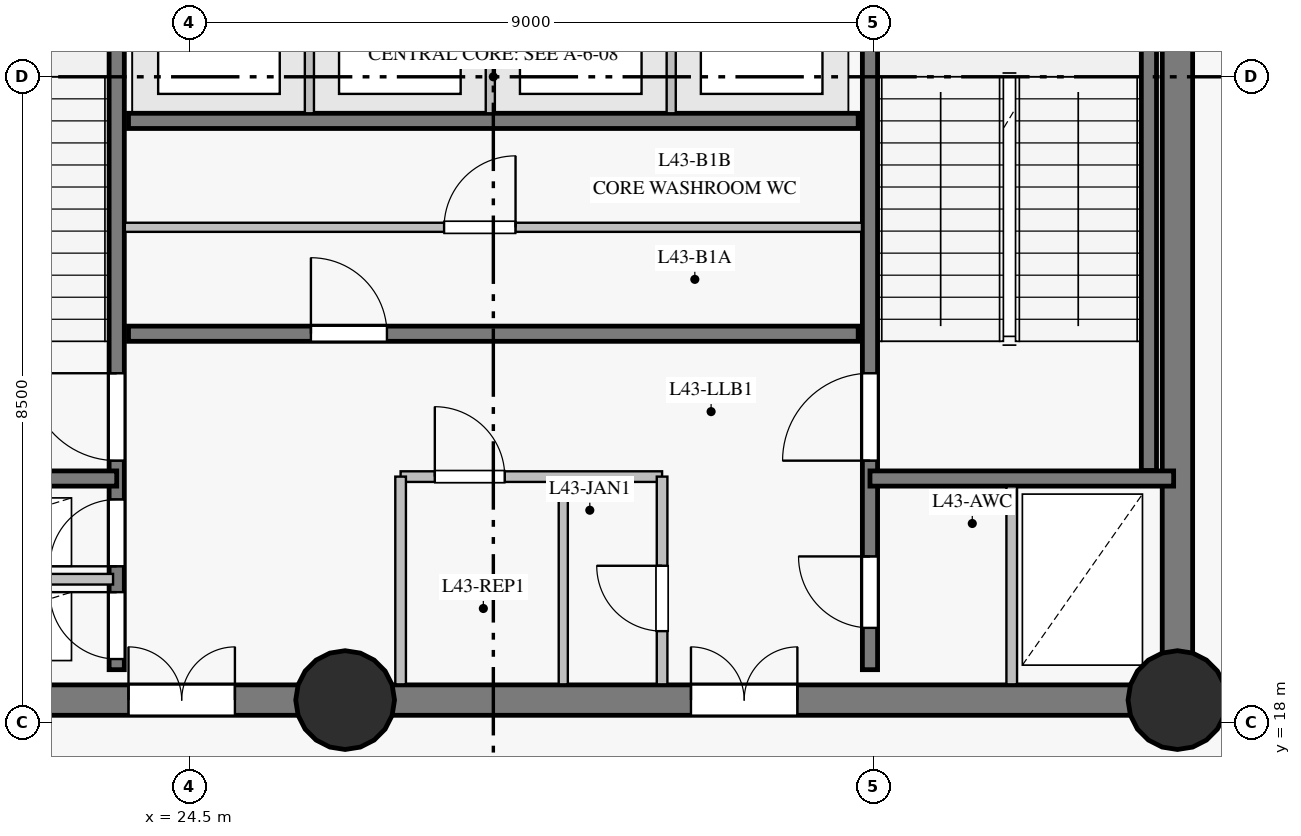
"""IFC4 building model, lengths in metres.
Left out: names, types, materials, properties, quantities, classifications, styles, units other than length and angle.
Written with IfcOpenShell. Run it as: python <this file> out.ifc"""

import sys

from ifc_helpers import new_model, si_unit, direction, frame, frame_2d, origin, origin_with_axes, origin_2d, place, context, subcontext, project, spatial, rectangle, circle, extrude, source, transform, mapped, element, fill, save


model = new_model("IFC4")
c1 = context("Model", 3, precision=1e-05, world=origin(), true_north=direction((0.0, 1.0)))
c2 = subcontext(c1, "Body", "Model", "MODEL_VIEW")
j1 = project(units=[si_unit("LENGTHUNIT", "METRE"), si_unit("PLANEANGLEUNIT", "RADIAN")], contexts=[c1])
p1 = place(None, origin())
s1 = spatial("IfcSite", under=j1, at=p1, CompositionType="ELEMENT")
p2 = place(p1, origin())
s2 = spatial("IfcBuilding", under=s1, at=p2, CompositionType="ELEMENT")
p3 = place(p2, frame((0.0, 0.0, 152.55)))
s3 = spatial("IfcBuildingStorey", under=s2, at=p3, CompositionType="ELEMENT", Elevation=152.55)
p4 = place(p3, frame((19.5, 18.3, 0.0), z_axis=(0.0, 0.0, 1.0), x_axis=(1.0, 0.0, 0.0)))
e1 = element("IfcWall", 1, at=p4, inside=s3, PredefinedType="SHEAR", context=c2, shape_type="SweptSolid", body=[
    extrude(rectangle(XDim=7.05, YDim=0.4, at=frame_2d((3.525, 0.0))), origin(), (0.0, 0.0, 1.0), 3.775),
])
p5 = place(p4, frame((4.2, 0.0, 0.0)))
e2 = element("IfcOpeningElement", 2, at=p5, cuts=e1, PredefinedType="OPENING", context=c2, shape_type="SweptSolid", body=[
    extrude(rectangle(XDim=1.4, YDim=2.2, at=frame_2d((0.7, 1.1))), frame((0.0, 0.21, 0.0), z_axis=(0.0, -1.0, 0.0), x_axis=(1.0, 0.0, 0.0)), (0.0, 0.0, 1.0), 0.42),
])
p6 = place(p3, frame((26.55, 18.3, 0.0), z_axis=(0.0, 0.0, 1.0), x_axis=(1.0, 0.0, 0.0)))
e3 = element("IfcWall", 3, at=p6, inside=s3, PredefinedType="SHEAR", context=c2, shape_type="SweptSolid", body=[
    extrude(rectangle(XDim=10.95, YDim=0.4, at=frame_2d((5.475, 0.0))), origin(), (0.0, 0.0, 1.0), 3.775),
])
p7 = place(p6, frame((4.55, 0.0, 0.0)))
e4 = element("IfcOpeningElement", 4, at=p7, cuts=e3, PredefinedType="OPENING", context=c2, shape_type="SweptSolid", body=[
    extrude(rectangle(XDim=1.4, YDim=2.2, at=frame_2d((0.7, 1.1))), frame((0.0, 0.21, 0.0), z_axis=(0.0, -1.0, 0.0), x_axis=(1.0, 0.0, 0.0)), (0.0, 0.0, 1.0), 0.42),
])
p8 = place(p3, frame((37.5, 18.3, 0.0), z_axis=(0.0, 0.0, 1.0), x_axis=(0.0, 1.0, 0.0)))
e5 = element("IfcWall", 5, at=p8, inside=s3, PredefinedType="SHEAR", context=c2, shape_type="SweptSolid", body=[
    extrude(rectangle(XDim=16.4, YDim=0.4, at=frame_2d((8.2, 0.0))), origin(), (0.0, 0.0, 1.0), 3.775),
])
p9 = place(p8, frame((14.15, 0.0, 0.0)))
e6 = element("IfcOpeningElement", 6, at=p9, cuts=e5, PredefinedType="OPENING", context=c2, shape_type="SweptSolid", body=[
    extrude(rectangle(XDim=1.2, YDim=2.15, at=frame_2d((0.6, 1.075))), frame((0.0, 0.21, 0.0), z_axis=(0.0, -1.0, 0.0), x_axis=(1.0, 0.0, 0.0)), (0.0, 0.0, 1.0), 0.42),
])
m1 = source(origin_with_axes(), c2, "Body", "SweptSolid", [
    extrude(circle(Radius=0.65, at=origin_2d()), origin(), (0.0, 0.0, 1.0), 4.0),
])
for number, where, z_axis, x_axis in (
    (7, (26.55, 18.3, 0.0), (0.0, 0.0, 1.0), (1.0, 0.0, 0.0)),
    (8, (37.5, 18.3, 0.0), (0.0, 0.0, 1.0), (1.0, 0.0, 0.0)),
):
    element("IfcColumn", number, at=place(p3, frame(where, z_axis=z_axis, x_axis=x_axis)), inside=s3, PredefinedType="COLUMN", context=c2, shape_type="MappedRepresentation", body=[
        mapped(m1, transform((0.0, 0.0, 0.0), scale=1.0)),
    ])
p10 = place(p3, frame((37.42, 5.238, 0.0), z_axis=(0.0, 0.0, 1.0), x_axis=(0.440185493808, 0.897906861005, 0.0)))
e9 = element("IfcWall", 9, at=p10, inside=s3, PredefinedType="SOLIDWALL", context=c2, shape_type="SweptSolid", body=[
    extrude(rectangle(XDim=13.922, YDim=0.28, at=frame_2d((6.961, 0.0))), origin(), (0.0, 0.0, 1.0), 3.775),
])
p11 = place(p10, frame((2.183, 0.0, 0.85)))
e10 = element("IfcOpeningElement", 10, at=p11, cuts=e9, PredefinedType="OPENING", context=c2, shape_type="SweptSolid", body=[
    extrude(rectangle(XDim=1.75, YDim=1.65, at=frame_2d((0.875, 0.825))), frame((0.0, 0.15, 0.0), z_axis=(0.0, -1.0, 0.0), x_axis=(1.0, 0.0, 0.0)), (0.0, 0.0, 1.0), 0.3),
])
p12 = place(p10, frame((7.23, 0.0, 0.85)))
e11 = element("IfcOpeningElement", 11, at=p12, cuts=e9, PredefinedType="OPENING", context=c2, shape_type="SweptSolid", body=[
    extrude(rectangle(XDim=1.75, YDim=1.65, at=frame_2d((0.875, 0.825))), frame((0.0, 0.15, 0.0), z_axis=(0.0, -1.0, 0.0), x_axis=(1.0, 0.0, 0.0)), (0.0, 0.0, 1.0), 0.3),
])
p13 = place(p10, frame((12.174, 0.0, 0.85)))
e12 = element("IfcOpeningElement", 12, at=p13, cuts=e9, PredefinedType="OPENING", context=c2, shape_type="SweptSolid", body=[
    extrude(rectangle(XDim=0.95, YDim=1.5, at=frame_2d((0.475, 0.75))), frame((0.0, 0.15, 0.0), z_axis=(0.0, -1.0, 0.0), x_axis=(1.0, 0.0, 0.0)), (0.0, 0.0, 1.0), 0.3),
])
p14 = place(p3, frame((23.545, 18.7, 0.0), z_axis=(0.0, 0.0, 1.0), x_axis=(0.0, 1.0, 0.0)))
e13 = element("IfcWall", 13, at=p14, inside=s3, PredefinedType="SHEAR", context=c2, shape_type="SweptSolid", body=[
    extrude(rectangle(XDim=15.6, YDim=0.2, at=frame_2d((7.8, 0.0))), origin(), (0.0, 0.0, 1.0), 3.775),
])
p15 = place(p14, frame((2.75, 0.0, 0.0)))
e14 = element("IfcOpeningElement", 14, at=p15, cuts=e13, PredefinedType="OPENING", context=c2, shape_type="SweptSolid", body=[
    extrude(rectangle(XDim=1.15, YDim=2.15, at=frame_2d((0.575, 1.075))), frame((0.0, 0.11, 0.0), z_axis=(0.0, -1.0, 0.0), x_axis=(1.0, 0.0, 0.0)), (0.0, 0.0, 1.0), 0.22),
])
p16 = place(p14, frame((0.14, 0.0, 0.0)))
e15 = element("IfcOpeningElement", 15, at=p16, cuts=e13, PredefinedType="OPENING", context=c2, shape_type="SweptSolid", body=[
    extrude(rectangle(XDim=0.88, YDim=2.1, at=frame_2d((0.44, 1.05))), frame((0.0, 0.11, 0.0), z_axis=(0.0, -1.0, 0.0), x_axis=(1.0, 0.0, 0.0)), (0.0, 0.0, 1.0), 0.22),
])
p17 = place(p14, frame((1.36, 0.0, 0.0)))
e16 = element("IfcOpeningElement", 16, at=p17, cuts=e13, PredefinedType="OPENING", context=c2, shape_type="SweptSolid", body=[
    extrude(rectangle(XDim=0.88, YDim=2.1, at=frame_2d((0.44, 1.05))), frame((0.0, 0.11, 0.0), z_axis=(0.0, -1.0, 0.0), x_axis=(1.0, 0.0, 0.0)), (0.0, 0.0, 1.0), 0.22),
])
p18 = place(p14, frame((12.1, 0.0, 0.0)))
e17 = element("IfcOpeningElement", 17, at=p18, cuts=e13, PredefinedType="OPENING", context=c2, shape_type="SweptSolid", body=[
    extrude(rectangle(XDim=1.12, YDim=2.15, at=frame_2d((0.56, 1.075))), frame((0.0, 0.11, 0.0), z_axis=(0.0, -1.0, 0.0), x_axis=(1.0, 0.0, 0.0)), (0.0, 0.0, 1.0), 0.22),
])
p19 = place(p14, frame((14.05, 0.0, 0.0)))
e18 = element("IfcOpeningElement", 18, at=p19, cuts=e13, PredefinedType="OPENING", context=c2, shape_type="SweptSolid", body=[
    extrude(rectangle(XDim=1.12, YDim=2.15, at=frame_2d((0.56, 1.075))), frame((0.0, 0.11, 0.0), z_axis=(0.0, -1.0, 0.0), x_axis=(1.0, 0.0, 0.0)), (0.0, 0.0, 1.0), 0.22),
])
p20 = place(p3, frame((33.455, 18.7, 0.0), z_axis=(0.0, 0.0, 1.0), x_axis=(0.0, 1.0, 0.0)))
e19 = element("IfcWall", 19, at=p20, inside=s3, PredefinedType="SHEAR", context=c2, shape_type="SweptSolid", body=[
    extrude(rectangle(XDim=15.6, YDim=0.2, at=frame_2d((7.8, 0.0))), origin(), (0.0, 0.0, 1.0), 3.775),
])
p21 = place(p20, frame((2.75, 0.0, 0.0)))
e20 = element("IfcOpeningElement", 20, at=p21, cuts=e19, PredefinedType="OPENING", context=c2, shape_type="SweptSolid", body=[
    extrude(rectangle(XDim=1.15, YDim=2.15, at=frame_2d((0.575, 1.075))), frame((0.0, 0.11, 0.0), z_axis=(0.0, -1.0, 0.0), x_axis=(1.0, 0.0, 0.0)), (0.0, 0.0, 1.0), 0.22),
])
p22 = place(p20, frame((0.55, 0.0, 0.0)))
e21 = element("IfcOpeningElement", 21, at=p22, cuts=e19, PredefinedType="OPENING", context=c2, shape_type="SweptSolid", body=[
    extrude(rectangle(XDim=0.94, YDim=2.1, at=frame_2d((0.47, 1.05))), frame((0.0, 0.11, 0.0), z_axis=(0.0, -1.0, 0.0), x_axis=(1.0, 0.0, 0.0)), (0.0, 0.0, 1.0), 0.22),
])
p23 = place(p3, frame((23.7, 23.12, 0.0), z_axis=(0.0, 0.0, 1.0), x_axis=(1.0, 0.0, 0.0)))
e22 = element("IfcWall", 22, at=p23, inside=s3, PredefinedType="SHEAR", context=c2, shape_type="SweptSolid", body=[
    extrude(rectangle(XDim=9.6, YDim=0.2, at=frame_2d((4.8, 0.0))), origin(), (0.0, 0.0, 1.0), 3.775),
])
p24 = place(p23, frame((2.4, 0.0, 0.0)))
e23 = element("IfcOpeningElement", 23, at=p24, cuts=e22, PredefinedType="OPENING", context=c2, shape_type="SweptSolid", body=[
    extrude(rectangle(XDim=1.0, YDim=2.15, at=frame_2d((0.5, 1.075))), frame((0.0, 0.11, 0.0), z_axis=(0.0, -1.0, 0.0), x_axis=(1.0, 0.0, 0.0)), (0.0, 0.0, 1.0), 0.22),
])
p25 = place(p3, frame((23.7, 25.92, 0.0), z_axis=(0.0, 0.0, 1.0), x_axis=(1.0, 0.0, 0.0)))
e24 = element("IfcWall", 24, at=p25, inside=s3, PredefinedType="SHEAR", context=c2, shape_type="SweptSolid", body=[
    extrude(rectangle(XDim=9.6, YDim=0.2, at=frame_2d((4.8, 0.0))), origin(), (0.0, 0.0, 1.0), 3.775),
])
p26 = place(p3, frame((37.125, 21.32, 0.0), z_axis=(0.0, 0.0, 1.0), x_axis=(0.0, 1.0, 0.0)))
e25 = element("IfcWall", 25, at=p26, inside=s3, PredefinedType="SHEAR", context=c2, shape_type="SweptSolid", body=[
    extrude(rectangle(XDim=7.5, YDim=0.2, at=frame_2d((3.75, 0.0))), origin(), (0.0, 0.0, 1.0), 3.775),
])
for number, where, z_axis, x_axis in (
    (26, (33.455, 21.215, 0.0), (0.0, 0.0, 1.0), (1.0, 0.0, 0.0)),
    (27, (19.55, 21.215, 0.0), (0.0, 0.0, 1.0), (1.0, 0.0, 0.0)),
):
    element("IfcWall", number, at=place(p3, frame(where, z_axis=z_axis, x_axis=x_axis)), inside=s3, PredefinedType="SHEAR", context=c2, shape_type="SweptSolid", body=[
        extrude(rectangle(XDim=3.995, YDim=0.2, at=frame_2d((1.998, 0.0))), origin(), (0.0, 0.0, 1.0), 3.775),
    ])
p27 = place(p3, frame((23.652, 24.52, 0.0), z_axis=(0.0, 0.0, 1.0), x_axis=(1.0, 0.0, 0.0)))
e28 = element("IfcWall", 28, at=p27, inside=s3, PredefinedType="PARTITIONING", context=c2, shape_type="SweptSolid", body=[
    extrude(rectangle(XDim=9.698, YDim=0.12, at=frame_2d((4.849, 0.0))), origin(), (0.0, 0.0, 1.0), 3.775),
])
p28 = place(p27, frame((4.2, 0.0, 0.0)))
e29 = element("IfcOpeningElement", 29, at=p28, cuts=e28, PredefinedType="OPENING", context=c2, shape_type="SweptSolid", body=[
    extrude(rectangle(XDim=0.94, YDim=2.1, at=frame_2d((0.47, 1.05))), frame((0.0, 0.07, 0.0), z_axis=(0.0, -1.0, 0.0), x_axis=(1.0, 0.0, 0.0)), (0.0, 0.0, 1.0), 0.14),
])
p29 = place(p3, frame((19.707, 19.89, 0.0), z_axis=(0.0, 0.0, 1.0), x_axis=(1.0, 0.0, 0.0)))
e30 = element("IfcWall", 30, at=p29, inside=s3, PredefinedType="PARTITIONING", context=c2, shape_type="SweptSolid", body=[
    extrude(rectangle(XDim=3.79, YDim=0.14, at=frame_2d((1.895, 0.0))), origin(), (0.0, 0.0, 1.0), 3.775),
])
p30 = place(p3, frame((27.28, 21.24, 0.0), z_axis=(0.0, 0.0, 1.0), x_axis=(1.0, 0.0, 0.0)))
e31 = element("IfcWall", 31, at=p30, inside=s3, PredefinedType="PARTITIONING", context=c2, shape_type="SweptSolid", body=[
    extrude(rectangle(XDim=3.44, YDim=0.14, at=frame_2d((1.72, 0.0))), origin(), (0.0, 0.0, 1.0), 3.775),
])
p31 = place(p30, frame((0.45, 0.0, 0.0)))
e32 = element("IfcOpeningElement", 32, at=p31, cuts=e31, PredefinedType="OPENING", context=c2, shape_type="SweptSolid", body=[
    extrude(rectangle(XDim=0.92, YDim=2.1, at=frame_2d((0.46, 1.05))), frame((0.0, 0.08, 0.0), z_axis=(0.0, -1.0, 0.0), x_axis=(1.0, 0.0, 0.0)), (0.0, 0.0, 1.0), 0.16),
])
p32 = place(p3, frame((27.28, 18.507, 0.0), z_axis=(0.0, 0.0, 1.0), x_axis=(0.0, 1.0, 0.0)))
e33 = element("IfcWall", 33, at=p32, inside=s3, PredefinedType="PARTITIONING", context=c2, shape_type="SweptSolid", body=[
    extrude(rectangle(XDim=2.733, YDim=0.14, at=frame_2d((1.366, 0.0))), origin(), (0.0, 0.0, 1.0), 3.775),
])
p33 = place(p3, frame((30.72, 18.507, 0.0), z_axis=(0.0, 0.0, 1.0), x_axis=(0.0, 1.0, 0.0)))
e34 = element("IfcWall", 34, at=p33, inside=s3, PredefinedType="PARTITIONING", context=c2, shape_type="SweptSolid", body=[
    extrude(rectangle(XDim=2.733, YDim=0.14, at=frame_2d((1.366, 0.0))), origin(), (0.0, 0.0, 1.0), 3.775),
])
p34 = place(p33, frame((0.7, 0.0, 0.0)))
e35 = element("IfcOpeningElement", 35, at=p34, cuts=e34, PredefinedType="OPENING", context=c2, shape_type="SweptSolid", body=[
    extrude(rectangle(XDim=0.86, YDim=2.1, at=frame_2d((0.43, 1.05))), frame((0.0, 0.08, 0.0), z_axis=(0.0, -1.0, 0.0), x_axis=(1.0, 0.0, 0.0)), (0.0, 0.0, 1.0), 0.16),
])
for number, where, z_axis, x_axis in (
    (36, (26.08, 26.02, 0.0), (0.0, 0.0, 1.0), (0.0, 1.0, 0.0)),
    (37, (28.46, 26.02, 0.0), (0.0, 0.0, 1.0), (0.0, 1.0, 0.0)),
    (38, (30.84, 26.02, 0.0), (0.0, 0.0, 1.0), (0.0, 1.0, 0.0)),
):
    element("IfcWall", number, at=place(p3, frame(where, z_axis=z_axis, x_axis=x_axis)), inside=s3, PredefinedType="PARTITIONING", context=c2, shape_type="SweptSolid", body=[
        extrude(rectangle(XDim=2.6, YDim=0.12, at=frame_2d((1.3, 0.0))), origin(), (0.0, 0.0, 1.0), 3.775),
    ])
p35 = place(p3, frame((29.42, 18.507, 0.0), z_axis=(0.0, 0.0, 1.0), x_axis=(0.0, 1.0, 0.0)))
e39 = element("IfcWall", 39, at=p35, inside=s3, PredefinedType="PARTITIONING", context=c2, shape_type="SweptSolid", body=[
    extrude(rectangle(XDim=2.662, YDim=0.12, at=frame_2d((1.331, 0.0))), origin(), (0.0, 0.0, 1.0), 3.775),
])
p36 = place(p3, frame((35.32, 18.507, 0.0), z_axis=(0.0, 0.0, 1.0), x_axis=(0.0, 1.0, 0.0)))
e40 = element("IfcWall", 40, at=p36, inside=s3, PredefinedType="PARTITIONING", context=c2, shape_type="SweptSolid", body=[
    extrude(rectangle(XDim=2.604, YDim=0.14, at=frame_2d((1.302, 0.0))), origin(), (0.0, 0.0, 1.0), 3.775),
])
m2 = source(origin_with_axes(), c2, "Body", "SweptSolid", [
    extrude(rectangle(XDim=1.15, YDim=2.15, at=frame_2d((0.575, 1.075))), frame((0.0, 0.025, 0.0), z_axis=(0.0, -1.0, 0.0), x_axis=(1.0, 0.0, 0.0)), (0.0, 0.0, 1.0), 0.05),
])
p37 = place(p15, origin())
e41 = element("IfcDoor", 41, at=p37, inside=s3, OperationType="SINGLE_SWING_RIGHT", PredefinedType="DOOR", context=c2, shape_type="MappedRepresentation", body=[
    mapped(m2, transform((0.0, 0.0, 0.0), scale=1.0)),
])
fill(e14, e41)
p38 = place(p21, origin())
e42 = element("IfcDoor", 42, at=p38, inside=s3, OperationType="SINGLE_SWING_LEFT", PredefinedType="DOOR", context=c2, shape_type="MappedRepresentation", body=[
    mapped(m2, transform((0.0, 0.0, 0.0), scale=1.0)),
])
fill(e20, e42)
m3 = source(origin_with_axes(), c2, "Body", "SweptSolid", [
    extrude(rectangle(XDim=0.88, YDim=2.1, at=frame_2d((0.44, 1.05))), frame((0.0, 0.025, 0.0), z_axis=(0.0, -1.0, 0.0), x_axis=(1.0, 0.0, 0.0)), (0.0, 0.0, 1.0), 0.05),
])
p39 = place(p16, origin())
e43 = element("IfcDoor", 43, at=p39, inside=s3, OperationType="SINGLE_SWING_RIGHT", PredefinedType="DOOR", context=c2, shape_type="MappedRepresentation", body=[
    mapped(m3, transform((0.0, 0.0, 0.0), scale=1.0)),
])
fill(e15, e43)
p40 = place(p17, origin())
e44 = element("IfcDoor", 44, at=p40, inside=s3, OperationType="SINGLE_SWING_LEFT", PredefinedType="DOOR", context=c2, shape_type="MappedRepresentation", body=[
    mapped(m3, transform((0.0, 0.0, 0.0), scale=1.0)),
])
fill(e16, e44)
m4 = source(origin_with_axes(), c2, "Body", "SweptSolid", [
    extrude(rectangle(XDim=1.4, YDim=2.2, at=frame_2d((0.7, 1.1))), frame((0.0, 0.025, 0.0), z_axis=(0.0, -1.0, 0.0), x_axis=(1.0, 0.0, 0.0)), (0.0, 0.0, 1.0), 0.05),
])
p41 = place(p5, origin())
e45 = element("IfcDoor", 45, at=p41, inside=s3, OperationType="DOUBLE_DOOR_SINGLE_SWING", PredefinedType="DOOR", context=c2, shape_type="MappedRepresentation", body=[
    mapped(m4, transform((0.0, 0.0, 0.0), scale=1.0)),
])
fill(e2, e45)
p42 = place(p7, origin())
e46 = element("IfcDoor", 46, at=p42, inside=s3, OperationType="DOUBLE_DOOR_SINGLE_SWING", PredefinedType="DOOR", context=c2, shape_type="MappedRepresentation", body=[
    mapped(m4, transform((0.0, 0.0, 0.0), scale=1.0)),
])
fill(e4, e46)
m5 = source(origin_with_axes(), c2, "Body", "SweptSolid", [
    extrude(rectangle(XDim=0.94, YDim=2.1, at=frame_2d((0.47, 1.05))), frame((0.0, 0.025, 0.0), z_axis=(0.0, -1.0, 0.0), x_axis=(1.0, 0.0, 0.0)), (0.0, 0.0, 1.0), 0.05),
])
p43 = place(p22, origin())
e47 = element("IfcDoor", 47, at=p43, inside=s3, OperationType="SINGLE_SWING_RIGHT", PredefinedType="DOOR", context=c2, shape_type="MappedRepresentation", body=[
    mapped(m5, transform((0.0, 0.0, 0.0), scale=1.0)),
])
fill(e21, e47)
m6 = source(origin_with_axes(), c2, "Body", "SweptSolid", [
    extrude(rectangle(XDim=0.92, YDim=2.1, at=frame_2d((0.46, 1.05))), frame((0.0, 0.025, 0.0), z_axis=(0.0, -1.0, 0.0), x_axis=(1.0, 0.0, 0.0)), (0.0, 0.0, 1.0), 0.05),
])
p44 = place(p31, origin())
e48 = element("IfcDoor", 48, at=p44, inside=s3, OperationType="SINGLE_SWING_LEFT", PredefinedType="DOOR", context=c2, shape_type="MappedRepresentation", body=[
    mapped(m6, transform((0.0, 0.0, 0.0), scale=1.0)),
])
fill(e32, e48)
m7 = source(origin_with_axes(), c2, "Body", "SweptSolid", [
    extrude(rectangle(XDim=0.86, YDim=2.1, at=frame_2d((0.43, 1.05))), frame((0.0, 0.025, 0.0), z_axis=(0.0, -1.0, 0.0), x_axis=(1.0, 0.0, 0.0)), (0.0, 0.0, 1.0), 0.05),
])
p45 = place(p34, origin())
e49 = element("IfcDoor", 49, at=p45, inside=s3, OperationType="SINGLE_SWING_RIGHT", PredefinedType="DOOR", context=c2, shape_type="MappedRepresentation", body=[
    mapped(m7, transform((0.0, 0.0, 0.0), scale=1.0)),
])
fill(e35, e49)
m8 = source(origin_with_axes(), c2, "Body", "SweptSolid", [
    extrude(rectangle(XDim=1.0, YDim=2.15, at=frame_2d((0.5, 1.075))), frame((0.0, 0.025, 0.0), z_axis=(0.0, -1.0, 0.0), x_axis=(1.0, 0.0, 0.0)), (0.0, 0.0, 1.0), 0.05),
])
p46 = place(p24, origin())
e50 = element("IfcDoor", 50, at=p46, inside=s3, OperationType="SINGLE_SWING_LEFT", PredefinedType="DOOR", context=c2, shape_type="MappedRepresentation", body=[
    mapped(m8, transform((0.0, 0.0, 0.0), scale=1.0)),
])
fill(e23, e50)
p47 = place(p28, origin())
e51 = element("IfcDoor", 51, at=p47, inside=s3, OperationType="SINGLE_SWING_RIGHT", PredefinedType="DOOR", context=c2, shape_type="MappedRepresentation", body=[
    mapped(m5, transform((0.0, 0.0, 0.0), scale=1.0)),
])
fill(e29, e51)
save(model, sys.argv[1])
